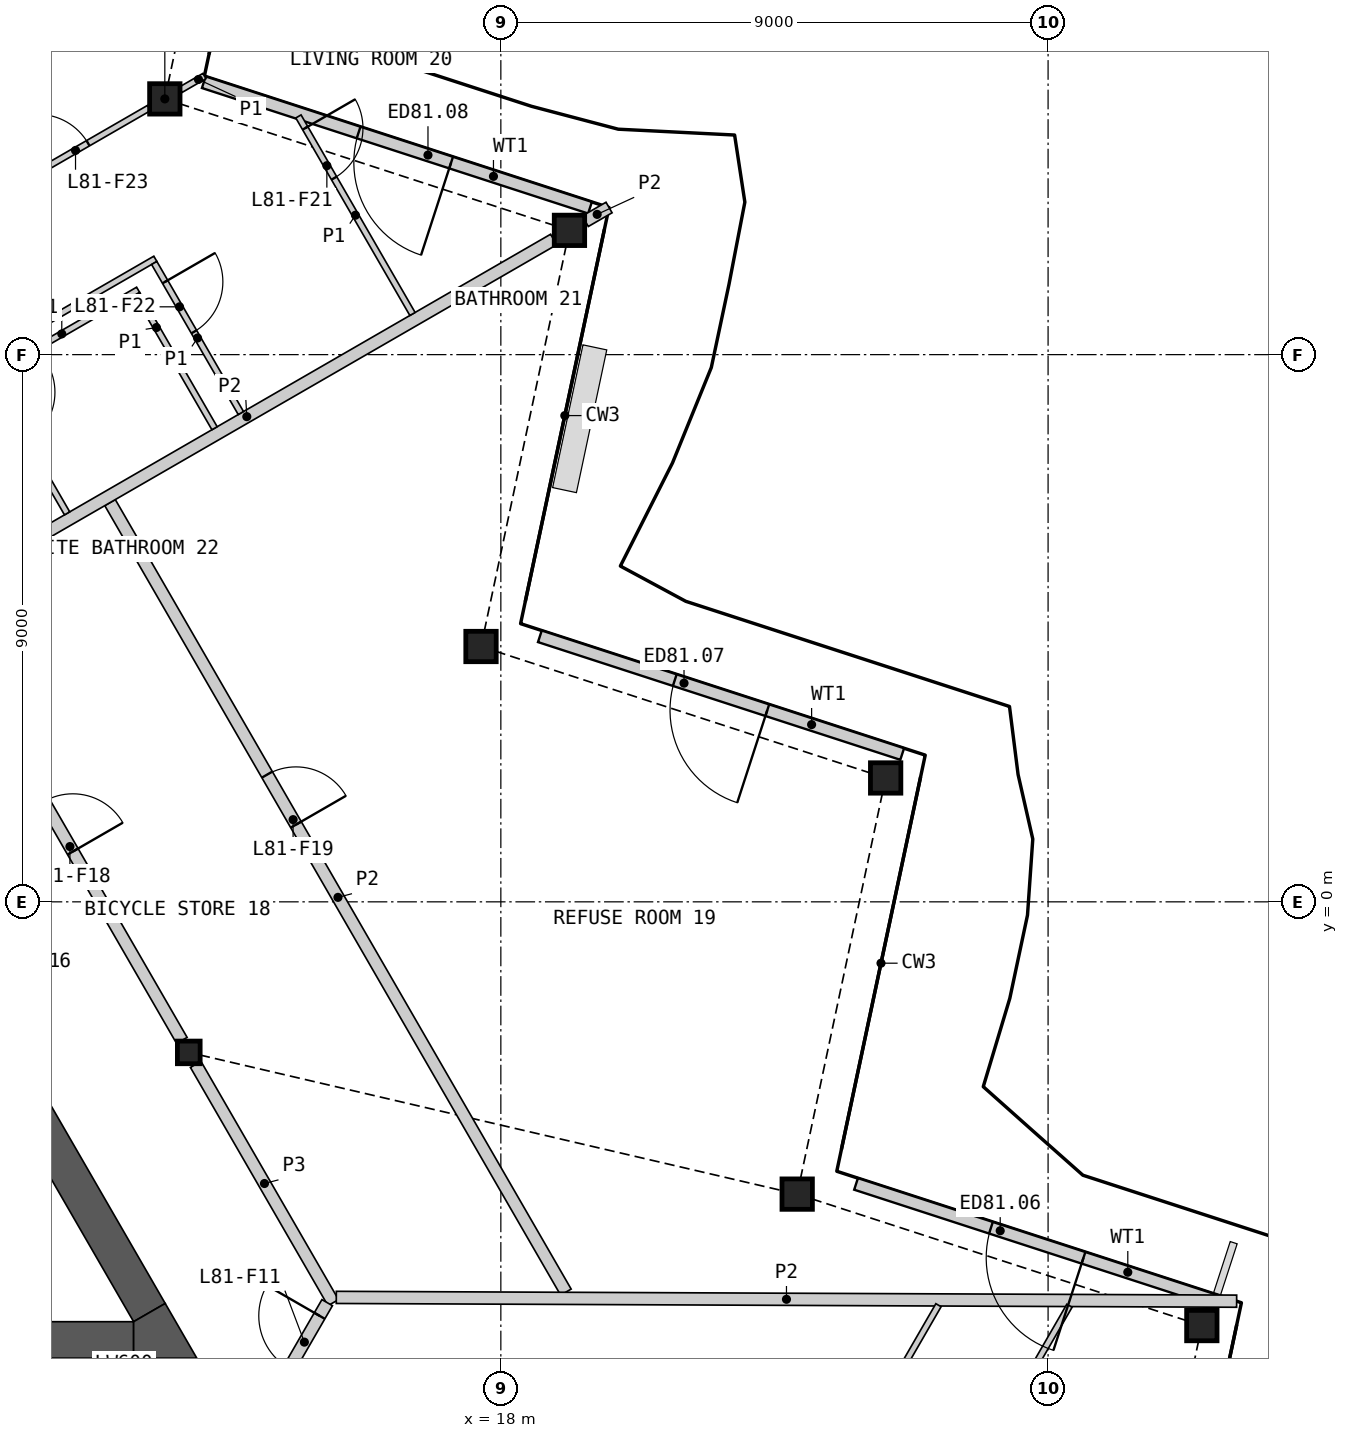
"""IFC4 building model, lengths in metres.
Left out: names, types, materials, properties, quantities, classifications, styles, units other than length and angle.
Written with IfcOpenShell. Run it as: python <this file> out.ifc"""

import sys

from ifc_helpers import new_model, si_unit, direction, frame, frame_2d, origin, origin_2d, place, context, subcontext, project, spatial, polyline, rectangle, hollow_rectangle, i_section, outline, extrude, element, fill, save


model = new_model("IFC4")
c1 = context("Model", 3, precision=1e-05, world=origin(), true_north=direction((0.0, 1.0)))
c2 = subcontext(c1, "Body", "Model", "MODEL_VIEW")
j1 = project(units=[si_unit("LENGTHUNIT", "METRE"), si_unit("PLANEANGLEUNIT", "RADIAN")], contexts=[c1])
p1 = place(None, origin())
s1 = spatial("IfcSite", under=j1, at=p1, CompositionType="ELEMENT")
p2 = place(p1, origin())
s2 = spatial("IfcBuilding", under=s1, at=p2, CompositionType="ELEMENT")
p3 = place(p2, frame((0.0, 0.0, 364.4)))
s3 = spatial("IfcBuildingStorey", under=s2, at=p3, CompositionType="ELEMENT", Elevation=364.4)
for number, where, z_axis, x_axis in (
    (1, (29.529, -6.969, 0.0), (0.0, 0.0, 1.0), (1.0, 0.0, 0.0)),
    (2, (22.874, -4.807, 0.0), (0.0, 0.0, 1.0), (1.0, 0.0, 0.0)),
    (3, (24.329, 2.037, 0.0), (0.0, 0.0, 1.0), (1.0, 0.0, 0.0)),
    (4, (17.674, 4.199, 0.0), (0.0, 0.0, 1.0), (1.0, 0.0, 0.0)),
    (5, (19.129, 11.044, 0.0), (0.0, 0.0, 1.0), (1.0, 0.0, 0.0)),
    (6, (12.474, 13.206, 0.0), (0.0, 0.0, 1.0), (1.0, 0.0, 0.0)),
):
    element("IfcColumn", number, at=place(p3, frame(where, z_axis=z_axis, x_axis=x_axis)), inside=s3, PredefinedType="COLUMN", context=c2, shape_type="SweptSolid", body=[
        extrude(hollow_rectangle(XDim=0.5, YDim=0.5, WallThickness=0.03, at=origin_2d()), origin(), (0.0, 0.0, 1.0), 3.4),
    ])
p4 = place(p3, frame((12.868, -2.476, 0.0), z_axis=(0.0, 0.0, 1.0), x_axis=(1.0, 0.0, 0.0)))
e7 = element("IfcColumn", 7, at=p4, inside=s3, PredefinedType="COLUMN", context=c2, shape_type="SweptSolid", body=[
    extrude(i_section(OverallWidth=0.374, OverallDepth=0.372, WebThickness=0.016, FlangeThickness=0.026, at=origin_2d()), origin(), (0.0, 0.0, 1.0), 3.4),
])
p5 = place(p3, frame((29.801, -6.576, 0.0), z_axis=(0.0, 0.0, 1.0), x_axis=(-0.951060123915, 0.309005891041, 0.0)))
e8 = element("IfcWall", 8, at=p5, inside=s3, PredefinedType="SOLIDWALL", context=c2, shape_type="SweptSolid", body=[
    extrude(rectangle(XDim=6.265, YDim=0.2, at=frame_2d((3.133, 0.0))), origin(), (0.0, 0.0, 1.0), 2.634),
])
p6 = place(p5, frame((2.333, 0.0, 0.0)))
e9 = element("IfcOpeningElement", 9, at=p6, cuts=e8, PredefinedType="OPENING", context=c2, shape_type="SweptSolid", body=[
    extrude(rectangle(XDim=1.6, YDim=2.25, at=frame_2d((0.8, 1.125))), frame((0.0, 0.11, 0.0), z_axis=(0.0, -1.0, 0.0), x_axis=(1.0, 0.0, 0.0)), (0.0, 0.0, 1.0), 0.22),
])
p7 = place(p3, frame((24.601, 2.431, 0.0), z_axis=(0.0, 0.0, 1.0), x_axis=(-0.951060123915, 0.309005891041, 0.0)))
e10 = element("IfcWall", 10, at=p7, inside=s3, PredefinedType="SOLIDWALL", context=c2, shape_type="SweptSolid", body=[
    extrude(rectangle(XDim=6.265, YDim=0.2, at=frame_2d((3.133, 0.0))), origin(), (0.0, 0.0, 1.0), 2.634),
])
p8 = place(p7, frame((2.333, 0.0, 0.0)))
e11 = element("IfcOpeningElement", 11, at=p8, cuts=e10, PredefinedType="OPENING", context=c2, shape_type="SweptSolid", body=[
    extrude(rectangle(XDim=1.6, YDim=2.25, at=frame_2d((0.8, 1.125))), frame((0.0, 0.11, 0.0), z_axis=(0.0, -1.0, 0.0), x_axis=(1.0, 0.0, 0.0)), (0.0, 0.0, 1.0), 0.22),
])
p9 = place(p3, frame((19.467, 11.416, 0.0), z_axis=(0.0, 0.0, 1.0), x_axis=(-0.951057706878, 0.309013330114, 0.0)))
e12 = element("IfcWall", 12, at=p9, inside=s3, PredefinedType="SOLIDWALL", context=c2, shape_type="SweptSolid", body=[
    extrude(rectangle(XDim=6.678, YDim=0.2, at=frame_2d((3.339, 0.0))), origin(), (0.0, 0.0, 1.0), 2.634),
])
p10 = place(p9, frame((2.402, 0.0, 0.0)))
e13 = element("IfcOpeningElement", 13, at=p10, cuts=e12, PredefinedType="OPENING", context=c2, shape_type="SweptSolid", body=[
    extrude(rectangle(XDim=1.6, YDim=2.25, at=frame_2d((0.8, 1.125))), frame((0.0, 0.11, 0.0), z_axis=(0.0, -1.0, 0.0), x_axis=(1.0, 0.0, 0.0)), (0.0, 0.0, 1.0), 0.22),
])
p11 = place(p3, frame((-11.961, -7.206, 0.0), z_axis=(0.0, 0.0, 1.0), x_axis=(1.0, 0.0, 0.0)))
e14 = element("IfcWall", 14, at=p11, inside=s3, PredefinedType="SHEAR", context=c2, shape_type="SweptSolid", body=[
    extrude(rectangle(XDim=23.921, YDim=0.6, at=frame_2d((11.961, 0.0))), origin(), (0.0, 0.0, 1.0), 3.1),
])
p12 = place(p3, frame((12.221, -6.756, 0.0), z_axis=(0.0, 0.0, 1.0), x_axis=(-0.50000604952, 0.866021911064, 0.0)))
e15 = element("IfcWall", 15, at=p12, inside=s3, PredefinedType="SHEAR", context=c2, shape_type="SweptSolid", body=[
    extrude(rectangle(XDim=4.869, YDim=0.6, at=frame_2d((2.434, 0.0))), origin(), (0.0, 0.0, 1.0), 3.1),
])
p13 = place(p3, origin())
e16 = element("IfcWall", 16, at=p13, inside=s3, PredefinedType="SHEAR", context=c2, shape_type="SweptSolid", body=[
    extrude(outline(polyline([(11.961, -7.506), (11.961, -6.906), (12.48, -6.606), (13.0, -7.506), (11.961, -7.506)])), origin(), (0.0, 0.0, 1.0), 3.1),
])
p14 = place(p3, frame((8.692, 4.756, 0.0), z_axis=(0.0, 0.0, 1.0), x_axis=(0.500001682468, -0.866024432409, 0.0)))
e17 = element("IfcWall", 17, at=p14, inside=s3, PredefinedType="PARTITIONING", context=c2, shape_type="SweptSolid", body=[
    extrude(rectangle(XDim=8.124, YDim=0.2, at=frame_2d((4.062, 0.0))), origin(), (0.0, 0.0, 1.0), 3.1),
])
p15 = place(p14, frame((3.587, 0.0, 0.0)))
e18 = element("IfcOpeningElement", 18, at=p15, cuts=e17, PredefinedType="OPENING", context=c2, shape_type="SweptSolid", body=[
    extrude(rectangle(XDim=0.95, YDim=2.1, at=frame_2d((0.475, 1.05))), frame((0.0, 0.11, 0.0), z_axis=(0.0, -1.0, 0.0), x_axis=(1.0, 0.0, 0.0)), (0.0, 0.0, 1.0), 0.22),
])
p16 = place(p3, frame((12.981, -2.673, 0.0), z_axis=(0.0, 0.0, 1.0), x_axis=(0.499974648164, -0.866040040179, 0.0)))
e19 = element("IfcWall", 19, at=p16, inside=s3, PredefinedType="PARTITIONING", context=c2, shape_type="SweptSolid", body=[
    extrude(rectangle(XDim=4.525, YDim=0.2, at=frame_2d((2.263, 0.0))), origin(), (0.0, 0.0, 1.0), 3.1),
])
p17 = place(p3, frame((13.293, -9.797, 0.0), z_axis=(0.0, 0.0, 1.0), x_axis=(0.499977520935, 0.86603838169, 0.0)))
e20 = element("IfcWall", 20, at=p17, inside=s3, PredefinedType="PARTITIONING", context=c2, shape_type="SweptSolid", body=[
    extrude(rectangle(XDim=3.701, YDim=0.2, at=frame_2d((1.851, 0.0))), origin(), (0.0, 0.0, 1.0), 3.1),
])
p18 = place(p17, frame((2.451, 0.0, 0.0)))
e21 = element("IfcOpeningElement", 21, at=p18, cuts=e20, PredefinedType="OPENING", context=c2, shape_type="SweptSolid", body=[
    extrude(rectangle(XDim=1.0, YDim=2.1, at=frame_2d((0.5, 1.05))), frame((0.0, 0.11, 0.0), z_axis=(0.0, -1.0, 0.0), x_axis=(1.0, 0.0, 0.0)), (0.0, 0.0, 1.0), 0.22),
])
p19 = place(p3, frame((11.573, 6.566, 0.0), z_axis=(0.0, 0.0, 1.0), x_axis=(0.499993542657, -0.866029131901, 0.0)))
e22 = element("IfcWall", 22, at=p19, inside=s3, PredefinedType="PARTITIONING", context=c2, shape_type="SweptSolid", body=[
    extrude(rectangle(XDim=14.994, YDim=0.2, at=frame_2d((7.497, 0.0))), origin(), (0.0, 0.0, 1.0), 2.33),
])
p20 = place(p19, frame((5.166, 0.0, 0.0)))
e23 = element("IfcOpeningElement", 23, at=p20, cuts=e22, PredefinedType="OPENING", context=c2, shape_type="SweptSolid", body=[
    extrude(rectangle(XDim=0.95, YDim=2.1, at=frame_2d((0.475, 1.05))), frame((0.0, 0.11, 0.0), z_axis=(0.0, -1.0, 0.0), x_axis=(1.0, 0.0, 0.0)), (0.0, 0.0, 1.0), 0.22),
])
p21 = place(p3, frame((15.294, -6.506, 0.0), z_axis=(0.0, 0.0, 1.0), x_axis=(0.99999116141, -0.004204414611, 0.0)))
e24 = element("IfcWall", 24, at=p21, inside=s3, PredefinedType="PARTITIONING", context=c2, shape_type="SweptSolid", body=[
    extrude(rectangle(XDim=14.807, YDim=0.2, at=frame_2d((7.404, 0.0))), origin(), (0.0, 0.0, 1.0), 2.33),
])
p22 = place(p3, frame((8.775, 5.066, 0.0), z_axis=(0.0, 0.0, 1.0), x_axis=(0.866023724155, 0.500002909193, 0.0)))
e25 = element("IfcWall", 25, at=p22, inside=s3, PredefinedType="PARTITIONING", context=c2, shape_type="SweptSolid", body=[
    extrude(rectangle(XDim=11.655, YDim=0.2, at=frame_2d((5.827, 0.0))), origin(), (0.0, 0.0, 1.0), 2.33),
])
p23 = place(p3, frame((19.389, 11.194, 0.0), z_axis=(0.0, 0.0, 1.0), x_axis=(0.866104518135, 0.499862944882, 0.0)))
e26 = element("IfcWall", 26, at=p23, inside=s3, PredefinedType="PARTITIONING", context=c2, shape_type="SweptSolid", body=[
    extrude(rectangle(XDim=0.451, YDim=0.2, at=frame_2d((0.226, 0.0))), origin(), (0.0, 0.0, 1.0), 2.33),
])
p24 = place(p3, frame((3.465, 14.01, 0.0), z_axis=(0.0, 0.0, 1.0), x_axis=(0.866032376801, 0.499987922186, 0.0)))
e27 = element("IfcWall", 27, at=p24, inside=s3, PredefinedType="PARTITIONING", context=c2, shape_type="SweptSolid", body=[
    extrude(rectangle(XDim=11.782, YDim=0.1, at=frame_2d((5.891, 0.0))), origin(), (0.0, 0.0, 1.0), 2.33),
])
p25 = place(p24, frame((6.67, 0.0, 0.0)))
e28 = element("IfcOpeningElement", 28, at=p25, cuts=e27, PredefinedType="OPENING", context=c2, shape_type="SweptSolid", body=[
    extrude(rectangle(XDim=0.95, YDim=2.1, at=frame_2d((0.475, 1.05))), frame((0.0, 0.06, 0.0), z_axis=(0.0, -1.0, 0.0), x_axis=(1.0, 0.0, 0.0)), (0.0, 0.0, 1.0), 0.12),
])
p26 = place(p3, frame((23.415, -13.461, 0.0), z_axis=(0.0, 0.0, 1.0), x_axis=(0.500011483804, 0.866018773506, 0.0)))
e29 = element("IfcWall", 29, at=p26, inside=s3, PredefinedType="PARTITIONING", context=c2, shape_type="SweptSolid", body=[
    extrude(rectangle(XDim=7.872, YDim=0.1, at=frame_2d((3.936, 0.0))), origin(), (0.0, 0.0, 1.0), 2.33),
])
p27 = place(p26, frame((3.461, 0.0, 0.0)))
e30 = element("IfcOpeningElement", 30, at=p27, cuts=e29, PredefinedType="OPENING", context=c2, shape_type="SweptSolid", body=[
    extrude(rectangle(XDim=0.95, YDim=2.1, at=frame_2d((0.475, 1.05))), frame((0.0, 0.06, 0.0), z_axis=(0.0, -1.0, 0.0), x_axis=(1.0, 0.0, 0.0)), (0.0, 0.0, 1.0), 0.12),
])
p28 = place(p3, frame((6.065, 9.506, 0.0), z_axis=(0.0, 0.0, 1.0), x_axis=(0.866018949465, 0.500011179042, 0.0)))
e31 = element("IfcWall", 31, at=p28, inside=s3, PredefinedType="PARTITIONING", context=c2, shape_type="SweptSolid", body=[
    extrude(rectangle(XDim=7.1, YDim=0.1, at=frame_2d((3.55, 0.0))), origin(), (0.0, 0.0, 1.0), 2.33),
])
p29 = place(p28, frame((4.992, 0.0, 0.0)))
e32 = element("IfcOpeningElement", 32, at=p29, cuts=e31, PredefinedType="OPENING", context=c2, shape_type="SweptSolid", body=[
    extrude(rectangle(XDim=0.95, YDim=2.1, at=frame_2d((0.475, 1.05))), frame((0.0, 0.06, 0.0), z_axis=(0.0, -1.0, 0.0), x_axis=(1.0, 0.0, 0.0)), (0.0, 0.0, 1.0), 0.12),
])
p30 = place(p3, frame((21.796, -12.526, 0.0), z_axis=(0.0, 0.0, 1.0), x_axis=(0.499994777381, 0.866028419044, 0.0)))
e33 = element("IfcWall", 33, at=p30, inside=s3, PredefinedType="PARTITIONING", context=c2, shape_type="SweptSolid", body=[
    extrude(rectangle(XDim=6.803, YDim=0.1, at=frame_2d((3.402, 0.0))), origin(), (0.0, 0.0, 1.0), 2.33),
])
p31 = place(p30, frame((1.361, 0.0, 0.0)))
e34 = element("IfcOpeningElement", 34, at=p31, cuts=e33, PredefinedType="OPENING", context=c2, shape_type="SweptSolid", body=[
    extrude(rectangle(XDim=0.95, YDim=2.1, at=frame_2d((0.475, 1.05))), frame((0.0, 0.06, 0.0), z_axis=(0.0, -1.0, 0.0), x_axis=(1.0, 0.0, 0.0)), (0.0, 0.0, 1.0), 0.12),
])
p32 = place(p3, frame((7.165, 7.601, 0.0), z_axis=(0.0, 0.0, 1.0), x_axis=(0.866017493347, 0.500013701029, 0.0)))
e35 = element("IfcWall", 35, at=p32, inside=s3, PredefinedType="PARTITIONING", context=c2, shape_type="SweptSolid", body=[
    extrude(rectangle(XDim=5.95, YDim=0.1, at=frame_2d((2.975, 0.0))), origin(), (0.0, 0.0, 1.0), 2.33),
])
p33 = place(p3, frame((14.671, 12.918, 0.0), z_axis=(0.0, 0.0, 1.0), x_axis=(0.499981580887, -0.866036037803, 0.0)))
e36 = element("IfcWall", 36, at=p33, inside=s3, PredefinedType="PARTITIONING", context=c2, shape_type="SweptSolid", body=[
    extrude(rectangle(XDim=3.752, YDim=0.1, at=frame_2d((1.876, 0.0))), origin(), (0.0, 0.0, 1.0), 2.33),
])
p34 = place(p33, frame((0.222, 0.0, 0.0)))
e37 = element("IfcOpeningElement", 37, at=p34, cuts=e36, PredefinedType="OPENING", context=c2, shape_type="SweptSolid", body=[
    extrude(rectangle(XDim=0.95, YDim=2.1, at=frame_2d((0.475, 1.05))), frame((0.0, 0.06, 0.0), z_axis=(0.0, -1.0, 0.0), x_axis=(1.0, 0.0, 0.0)), (0.0, 0.0, 1.0), 0.12),
])
p35 = place(p3, frame((12.3, 10.508, 0.0), z_axis=(0.0, 0.0, 1.0), x_axis=(0.499999279071, -0.866025820012, 0.0)))
e38 = element("IfcWall", 38, at=p35, inside=s3, PredefinedType="PARTITIONING", context=c2, shape_type="SweptSolid", body=[
    extrude(rectangle(XDim=2.85, YDim=0.1, at=frame_2d((1.425, 0.0))), origin(), (0.0, 0.0, 1.0), 2.33),
])
p36 = place(p35, frame((0.358, 0.0, 0.0)))
e39 = element("IfcOpeningElement", 39, at=p36, cuts=e38, PredefinedType="OPENING", context=c2, shape_type="SweptSolid", body=[
    extrude(rectangle(XDim=0.95, YDim=2.1, at=frame_2d((0.475, 1.05))), frame((0.0, 0.06, 0.0), z_axis=(0.0, -1.0, 0.0), x_axis=(1.0, 0.0, 0.0)), (0.0, 0.0, 1.0), 0.12),
])
p37 = place(p3, frame((9.523, 8.616, 0.0), z_axis=(0.0, 0.0, 1.0), x_axis=(0.866032775405, 0.499987231761, 0.0)))
e40 = element("IfcWall", 40, at=p37, inside=s3, PredefinedType="PARTITIONING", context=c2, shape_type="SweptSolid", body=[
    extrude(rectangle(XDim=2.9, YDim=0.1, at=frame_2d((1.45, 0.0))), origin(), (0.0, 0.0, 1.0), 2.33),
])
p38 = place(p3, frame((12.017, 9.998, 0.0), z_axis=(0.0, 0.0, 1.0), x_axis=(0.499948979701, -0.866054858364, 0.0)))
e41 = element("IfcWall", 41, at=p38, inside=s3, PredefinedType="PARTITIONING", context=c2, shape_type="SweptSolid", body=[
    extrude(rectangle(XDim=2.55, YDim=0.1, at=frame_2d((1.275, 0.0))), origin(), (0.0, 0.0, 1.0), 2.33),
])
p39 = place(p3, frame((9.592, 8.598, 0.0), z_axis=(0.0, 0.0, 1.0), x_axis=(0.499990435942, -0.866030925526, 0.0)))
e42 = element("IfcWall", 42, at=p39, inside=s3, PredefinedType="PARTITIONING", context=c2, shape_type="SweptSolid", body=[
    extrude(rectangle(XDim=2.55, YDim=0.1, at=frame_2d((1.275, 0.0))), origin(), (0.0, 0.0, 1.0), 2.33),
])
p40 = place(p39, frame((0.25, 0.0, 0.0)))
e43 = element("IfcOpeningElement", 43, at=p40, cuts=e42, PredefinedType="OPENING", context=c2, shape_type="SweptSolid", body=[
    extrude(rectangle(XDim=0.95, YDim=2.1, at=frame_2d((0.475, 1.05))), frame((0.0, 0.06, 0.0), z_axis=(0.0, -1.0, 0.0), x_axis=(1.0, 0.0, 0.0)), (0.0, 0.0, 1.0), 0.12),
])
p41 = place(p3, frame((12.734, 13.356, 0.0), z_axis=(0.0, 0.0, 1.0), x_axis=(0.865870279271, 0.500268587336, 0.0)))
e44 = element("IfcWall", 44, at=p41, inside=s3, PredefinedType="PARTITIONING", context=c2, shape_type="SweptSolid", body=[
    extrude(rectangle(XDim=0.451, YDim=0.1, at=frame_2d((0.226, 0.0))), origin(), (0.0, 0.0, 1.0), 2.33),
])
p42 = place(p6, origin())
e45 = element("IfcDoor", 45, at=p42, inside=s3, OperationType="DOUBLE_DOOR_SINGLE_SWING", PredefinedType="DOOR", context=c2, shape_type="SweptSolid", body=[
    extrude(rectangle(XDim=1.6, YDim=2.25, at=frame_2d((0.8, 1.125))), frame((0.0, 0.025, 0.0), z_axis=(0.0, -1.0, 0.0), x_axis=(1.0, 0.0, 0.0)), (0.0, 0.0, 1.0), 0.05),
])
fill(e9, e45)
p43 = place(p8, origin())
e46 = element("IfcDoor", 46, at=p43, inside=s3, OperationType="DOUBLE_DOOR_SINGLE_SWING", PredefinedType="DOOR", context=c2, shape_type="SweptSolid", body=[
    extrude(rectangle(XDim=1.6, YDim=2.25, at=frame_2d((0.8, 1.125))), frame((0.0, 0.025, 0.0), z_axis=(0.0, -1.0, 0.0), x_axis=(1.0, 0.0, 0.0)), (0.0, 0.0, 1.0), 0.05),
])
fill(e11, e46)
p44 = place(p10, origin())
e47 = element("IfcDoor", 47, at=p44, inside=s3, OperationType="DOUBLE_DOOR_SINGLE_SWING", PredefinedType="DOOR", context=c2, shape_type="SweptSolid", body=[
    extrude(rectangle(XDim=1.6, YDim=2.25, at=frame_2d((0.8, 1.125))), frame((0.0, 0.025, 0.0), z_axis=(0.0, -1.0, 0.0), x_axis=(1.0, 0.0, 0.0)), (0.0, 0.0, 1.0), 0.05),
])
fill(e13, e47)
p45 = place(p18, origin())
e48 = element("IfcDoor", 48, at=p45, inside=s3, OperationType="SINGLE_SWING_RIGHT", PredefinedType="DOOR", context=c2, shape_type="SweptSolid", body=[
    extrude(rectangle(XDim=1.0, YDim=2.1, at=frame_2d((0.5, 1.05))), frame((0.0, 0.025, 0.0), z_axis=(0.0, -1.0, 0.0), x_axis=(1.0, 0.0, 0.0)), (0.0, 0.0, 1.0), 0.05),
])
fill(e21, e48)
p46 = place(p15, origin())
e49 = element("IfcDoor", 49, at=p46, inside=s3, OperationType="SINGLE_SWING_RIGHT", PredefinedType="DOOR", context=c2, shape_type="SweptSolid", body=[
    extrude(rectangle(XDim=0.95, YDim=2.1, at=frame_2d((0.475, 1.05))), frame((0.0, 0.025, 0.0), z_axis=(0.0, -1.0, 0.0), x_axis=(1.0, 0.0, 0.0)), (0.0, 0.0, 1.0), 0.05),
])
fill(e18, e49)
p47 = place(p20, origin())
e50 = element("IfcDoor", 50, at=p47, inside=s3, OperationType="SINGLE_SWING_RIGHT", PredefinedType="DOOR", context=c2, shape_type="SweptSolid", body=[
    extrude(rectangle(XDim=0.95, YDim=2.1, at=frame_2d((0.475, 1.05))), frame((0.0, 0.025, 0.0), z_axis=(0.0, -1.0, 0.0), x_axis=(1.0, 0.0, 0.0)), (0.0, 0.0, 1.0), 0.05),
])
fill(e23, e50)
p48 = place(p34, origin())
e51 = element("IfcDoor", 51, at=p48, inside=s3, OperationType="SINGLE_SWING_LEFT", PredefinedType="DOOR", context=c2, shape_type="SweptSolid", body=[
    extrude(rectangle(XDim=0.95, YDim=2.1, at=frame_2d((0.475, 1.05))), frame((0.0, 0.025, 0.0), z_axis=(0.0, -1.0, 0.0), x_axis=(1.0, 0.0, 0.0)), (0.0, 0.0, 1.0), 0.05),
])
fill(e37, e51)
p49 = place(p36, origin())
e52 = element("IfcDoor", 52, at=p49, inside=s3, OperationType="SINGLE_SWING_LEFT", PredefinedType="DOOR", context=c2, shape_type="SweptSolid", body=[
    extrude(rectangle(XDim=0.95, YDim=2.1, at=frame_2d((0.475, 1.05))), frame((0.0, 0.025, 0.0), z_axis=(0.0, -1.0, 0.0), x_axis=(1.0, 0.0, 0.0)), (0.0, 0.0, 1.0), 0.05),
])
fill(e39, e52)
p50 = place(p29, origin())
e53 = element("IfcDoor", 53, at=p50, inside=s3, OperationType="SINGLE_SWING_LEFT", PredefinedType="DOOR", context=c2, shape_type="SweptSolid", body=[
    extrude(rectangle(XDim=0.95, YDim=2.1, at=frame_2d((0.475, 1.05))), frame((0.0, 0.025, 0.0), z_axis=(0.0, -1.0, 0.0), x_axis=(1.0, 0.0, 0.0)), (0.0, 0.0, 1.0), 0.05),
])
fill(e32, e53)
save(model, sys.argv[1])
